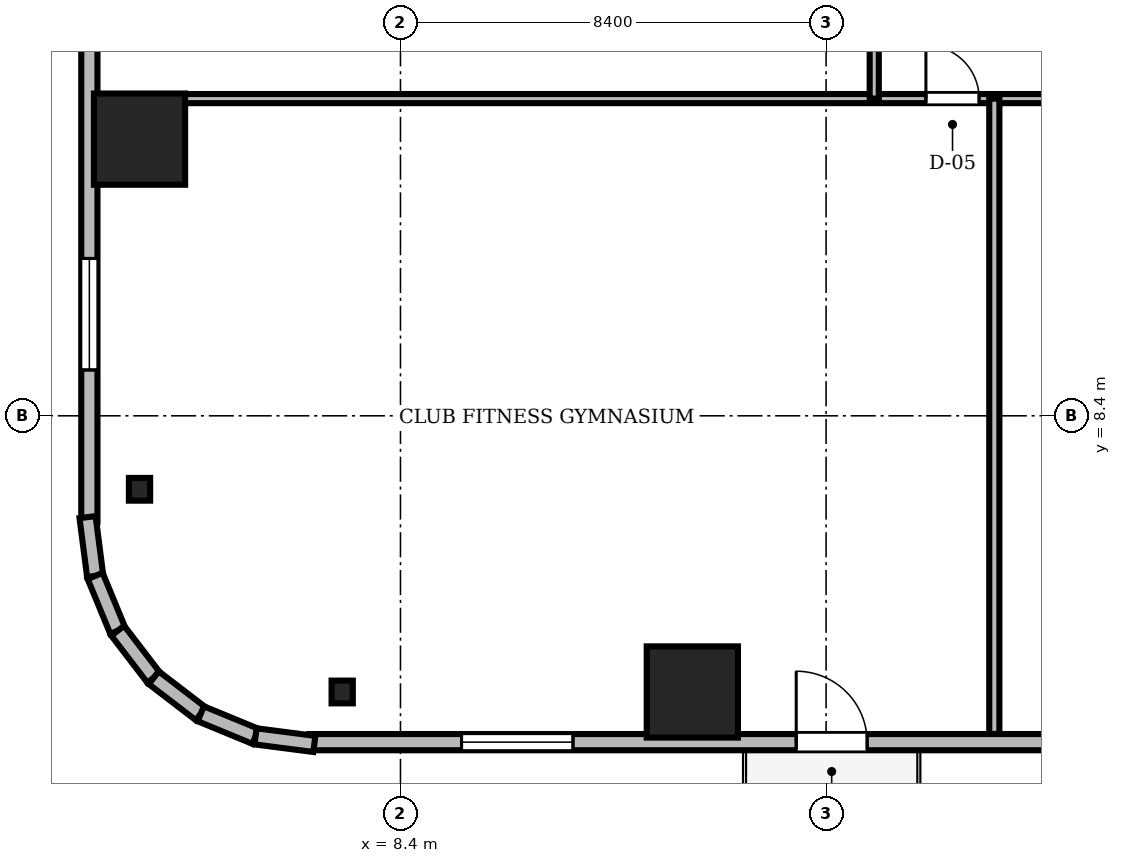
"""IFC4 building model, lengths in metres.
Left out: names, types, materials, properties, quantities, classifications, styles, units other than length and angle.
Written with IfcOpenShell. Run it as: python <this file> out.ifc"""

import sys

from ifc_helpers import new_model, si_unit, direction, frame, frame_2d, origin, origin_2d, place, context, subcontext, project, spatial, rectangle, i_section, extrude, source, transform, mapped, element, fill, save


model = new_model("IFC4")
c1 = context("Model", 3, precision=1e-05, world=origin(), true_north=direction((0.0, 1.0)))
c2 = subcontext(c1, "Body", "Model", "MODEL_VIEW")
j1 = project(units=[si_unit("LENGTHUNIT", "METRE"), si_unit("PLANEANGLEUNIT", "RADIAN")], contexts=[c1])
p1 = place(None, origin())
s1 = spatial("IfcSite", under=j1, at=p1, CompositionType="ELEMENT")
p2 = place(p1, origin())
s2 = spatial("IfcBuilding", under=s1, at=p2, CompositionType="ELEMENT")
p3 = place(p2, frame((0.0, 0.0, 31.25)))
s3 = spatial("IfcBuildingStorey", under=s2, at=p3, CompositionType="ELEMENT", Elevation=31.25)
m1 = source(origin(), c2, "Body", "SweptSolid", [
    extrude(rectangle(XDim=1.8, YDim=1.8, at=origin_2d()), origin(), (0.0, 0.0, 1.0), 3.41),
])
for number, where, z_axis, x_axis in (
    (1, (14.16, 2.95, 0.0), (0.0, 0.0, 1.0), (1.0, 0.0, 0.0)),
    (2, (3.25, 13.86, 0.0), (0.0, 0.0, 1.0), (1.0, 0.0, 0.0)),
):
    element("IfcColumn", number, at=place(p3, frame(where, z_axis=z_axis, x_axis=x_axis)), inside=s3, PredefinedType="COLUMN", context=c2, shape_type="MappedRepresentation", body=[
        mapped(m1, transform((0.0, 0.0, 0.0), scale=1.0)),
    ])
m2 = source(origin(), c2, "Body", "SweptSolid", [
    extrude(i_section(OverallWidth=0.419, OverallDepth=0.449, WebThickness=0.031, FlangeThickness=0.048, FilletRadius=0.015, at=origin_2d()), origin(), (0.0, 0.0, 1.0), 3.41),
])
for number, where, z_axis, x_axis in (
    (3, (7.25, 2.95, 0.0), (0.0, 0.0, 1.0), (1.0, 0.0, 0.0)),
    (4, (3.25, 6.95, 0.0), (0.0, 0.0, 1.0), (1.0, 0.0, 0.0)),
):
    element("IfcColumn", number, at=place(p3, frame(where, z_axis=z_axis, x_axis=x_axis)), inside=s3, PredefinedType="COLUMN", context=c2, shape_type="MappedRepresentation", body=[
        mapped(m2, transform((0.0, 0.0, 0.0), scale=1.0)),
    ])
m3 = source(origin(), c2, "Body", "SweptSolid", [
    extrude(rectangle(XDim=15.6, YDim=0.32, at=frame_2d((7.8, 0.0))), origin(), (0.0, 0.0, 1.0), 3.41),
])
p4 = place(p3, frame((6.6, 1.96, 0.0), z_axis=(0.0, 0.0, 1.0), x_axis=(1.0, 0.0, 0.0)))
e5 = element("IfcWall", 5, at=p4, inside=s3, PredefinedType="SOLIDWALL", context=c2, shape_type="MappedRepresentation", body=[
    mapped(m3, transform((0.0, 0.0, 0.0), scale=1.0)),
])
m4 = source(origin(), c2, "Body", "SweptSolid", [
    extrude(rectangle(XDim=1.4, YDim=2.3, at=frame_2d((0.7, 1.15))), frame((0.0, 0.17, 0.0), z_axis=(0.0, -1.0, 0.0), x_axis=(1.0, 0.0, 0.0)), (0.0, 0.0, 1.0), 0.34),
])
p5 = place(p4, frame((9.61, 0.0, 0.0)))
e6 = element("IfcOpeningElement", 6, at=p5, cuts=e5, PredefinedType="OPENING", context=c2, shape_type="MappedRepresentation", body=[
    mapped(m4, transform((0.0, 0.0, 0.0), scale=1.0)),
])
m5 = source(origin(), c2, "Body", "SweptSolid", [
    extrude(rectangle(XDim=2.2, YDim=2.4, at=frame_2d((1.1, 1.2))), frame((0.0, 0.17, 0.0), z_axis=(0.0, -1.0, 0.0), x_axis=(1.0, 0.0, 0.0)), (0.0, 0.0, 1.0), 0.34),
])
p6 = place(p4, frame((3.005, 0.0, 0.72)))
e7 = element("IfcOpeningElement", 7, at=p6, cuts=e5, PredefinedType="OPENING", context=c2, shape_type="MappedRepresentation", body=[
    mapped(m5, transform((0.0, 0.0, 0.0), scale=1.0)),
])
p7 = place(p3, frame((2.26, 21.9, 0.0), z_axis=(0.0, 0.0, 1.0), x_axis=(0.0, -1.0, 0.0)))
e8 = element("IfcWall", 8, at=p7, inside=s3, PredefinedType="SOLIDWALL", context=c2, shape_type="MappedRepresentation", body=[
    mapped(m3, transform((0.0, 0.0, 0.0), scale=1.0)),
])
p8 = place(p7, frame((10.395, 0.0, 0.72)))
e9 = element("IfcOpeningElement", 9, at=p8, cuts=e8, PredefinedType="OPENING", context=c2, shape_type="MappedRepresentation", body=[
    mapped(m5, transform((0.0, 0.0, 0.0), scale=1.0)),
])
m6 = source(origin(), c2, "Body", "SweptSolid", [
    extrude(rectangle(XDim=1.171, YDim=0.32, at=frame_2d((0.585, 0.0))), origin(), (0.0, 0.0, 1.0), 3.41),
])
p9 = place(p3, frame((2.224, 6.401, 0.0), z_axis=(0.0, 0.0, 1.0), x_axis=(0.128269133229, -0.991739395941, 0.0)))
e10 = element("IfcWall", 10, at=p9, inside=s3, PredefinedType="SOLIDWALL", context=c2, shape_type="MappedRepresentation", body=[
    mapped(m6, transform((0.0, 0.0, 0.0), scale=1.0)),
])
m7 = source(origin(), c2, "Body", "SweptSolid", [
    extrude(rectangle(XDim=1.169, YDim=0.32, at=frame_2d((0.584, 0.0))), origin(), (0.0, 0.0, 1.0), 3.41),
])
for number, where, z_axis, x_axis in (
    (11, (2.375, 5.24, 0.0), (0.0, 0.0, 1.0), (0.381, -0.925, 0.0)),
    (12, (2.82, 4.159, 0.0), (0.0, 0.0, 1.0), (0.608, -0.794, 0.0)),
):
    element("IfcWall", number, at=place(p3, frame(where, z_axis=z_axis, x_axis=x_axis)), inside=s3, PredefinedType="SOLIDWALL", context=c2, shape_type="MappedRepresentation", body=[
        mapped(m7, transform((0.0, 0.0, 0.0), scale=1.0)),
    ])
m8 = source(origin(), c2, "Body", "SweptSolid", [
    extrude(rectangle(XDim=1.169, YDim=0.32, at=frame_2d((0.584, 0.0))), origin(), (0.0, 0.0, 1.0), 3.41),
])
p10 = place(p3, frame((3.531, 3.231, 0.0), z_axis=(0.0, 0.0, 1.0), x_axis=(0.793663520347, -0.608356981114, 0.0)))
e13 = element("IfcWall", 13, at=p10, inside=s3, PredefinedType="SOLIDWALL", context=c2, shape_type="MappedRepresentation", body=[
    mapped(m8, transform((0.0, 0.0, 0.0), scale=1.0)),
])
m9 = source(origin(), c2, "Body", "SweptSolid", [
    extrude(rectangle(XDim=1.169, YDim=0.32, at=frame_2d((0.585, 0.0))), origin(), (0.0, 0.0, 1.0), 3.41),
])
p11 = place(p3, frame((4.459, 2.52, 0.0), z_axis=(0.0, 0.0, 1.0), x_axis=(0.924479075121, -0.381232789334, 0.0)))
e14 = element("IfcWall", 14, at=p11, inside=s3, PredefinedType="SOLIDWALL", context=c2, shape_type="MappedRepresentation", body=[
    mapped(m9, transform((0.0, 0.0, 0.0), scale=1.0)),
])
m10 = source(origin(), c2, "Body", "SweptSolid", [
    extrude(rectangle(XDim=1.17, YDim=0.32, at=frame_2d((0.585, 0.0))), origin(), (0.0, 0.0, 1.0), 3.41),
])
p12 = place(p3, frame((5.54, 2.074, 0.0), z_axis=(0.0, 0.0, 1.0), x_axis=(0.991762485493, -0.128090485085, 0.0)))
e15 = element("IfcWall", 15, at=p12, inside=s3, PredefinedType="SOLIDWALL", context=c2, shape_type="MappedRepresentation", body=[
    mapped(m10, transform((0.0, 0.0, 0.0), scale=1.0)),
])
m11 = source(origin(), c2, "Body", "SweptSolid", [
    extrude(rectangle(XDim=46.156, YDim=0.18, at=frame_2d((23.078, 0.0))), origin(), (0.0, 0.0, 1.0), 2.652),
])
p13 = place(p3, frame((2.422, 14.66, 0.0), z_axis=(0.0, 0.0, 1.0), x_axis=(1.0, 0.0, 0.0)))
e16 = element("IfcWall", 16, at=p13, inside=s3, PredefinedType="PARTITIONING", context=c2, shape_type="MappedRepresentation", body=[
    mapped(m11, transform((0.0, 0.0, 0.0), scale=1.0)),
])
m12 = source(origin(), c2, "Body", "SweptSolid", [
    extrude(rectangle(XDim=1.05, YDim=2.2, at=frame_2d((0.525, 1.1))), frame((0.0, 0.1, 0.0), z_axis=(0.0, -1.0, 0.0), x_axis=(1.0, 0.0, 0.0)), (0.0, 0.0, 1.0), 0.2),
])
p14 = place(p13, frame((16.348, 0.0, 0.0)))
e17 = element("IfcOpeningElement", 17, at=p14, cuts=e16, PredefinedType="OPENING", context=c2, shape_type="MappedRepresentation", body=[
    mapped(m12, transform((0.0, 0.0, 0.0), scale=1.0)),
])
p15 = place(p13, frame((20.38, 0.0, 0.0)))
e18 = element("IfcOpeningElement", 18, at=p15, cuts=e16, PredefinedType="OPENING", context=c2, shape_type="MappedRepresentation", body=[
    mapped(m12, transform((0.0, 0.0, 0.0), scale=1.0)),
])
p16 = place(p13, frame((26.783, 0.0, 0.0)))
e19 = element("IfcOpeningElement", 19, at=p16, cuts=e16, PredefinedType="OPENING", context=c2, shape_type="MappedRepresentation", body=[
    mapped(m12, transform((0.0, 0.0, 0.0), scale=1.0)),
])
p17 = place(p13, frame((33.186, 0.0, 0.0)))
e20 = element("IfcOpeningElement", 20, at=p17, cuts=e16, PredefinedType="OPENING", context=c2, shape_type="MappedRepresentation", body=[
    mapped(m12, transform((0.0, 0.0, 0.0), scale=1.0)),
])
p18 = place(p13, frame((40.998, 0.0, 0.0)))
e21 = element("IfcOpeningElement", 21, at=p18, cuts=e16, PredefinedType="OPENING", context=c2, shape_type="MappedRepresentation", body=[
    mapped(m12, transform((0.0, 0.0, 0.0), scale=1.0)),
])
m13 = source(origin(), c2, "Body", "SweptSolid", [
    extrude(rectangle(XDim=13.89, YDim=0.18, at=frame_2d((6.945, 0.0))), origin(), (0.0, 0.0, 1.0), 2.802),
])
p19 = place(p3, frame((17.75, 14.66, 0.0), z_axis=(0.0, 0.0, 1.0), x_axis=(0.0, 1.0, 0.0)))
e22 = element("IfcWall", 22, at=p19, inside=s3, PredefinedType="PARTITIONING", context=c2, shape_type="MappedRepresentation", body=[
    mapped(m13, transform((0.0, 0.0, 0.0), scale=1.0)),
])
p20 = place(p19, frame((1.77, 0.0, 0.0)))
e23 = element("IfcOpeningElement", 23, at=p20, cuts=e22, PredefinedType="OPENING", context=c2, shape_type="MappedRepresentation", body=[
    mapped(m12, transform((0.0, 0.0, 0.0), scale=1.0)),
])
m14 = source(origin(), c2, "Body", "SweptSolid", [
    extrude(rectangle(XDim=0.95, YDim=2.15, at=frame_2d((0.475, 1.075))), frame((0.0, 0.1, 0.0), z_axis=(0.0, -1.0, 0.0), x_axis=(1.0, 0.0, 0.0)), (0.0, 0.0, 1.0), 0.2),
])
p21 = place(p19, frame((7.575, 0.0, 0.0)))
e24 = element("IfcOpeningElement", 24, at=p21, cuts=e22, PredefinedType="OPENING", context=c2, shape_type="MappedRepresentation", body=[
    mapped(m14, transform((0.0, 0.0, 0.0), scale=1.0)),
])
p22 = place(p19, frame((10.93, 0.0, 0.0)))
e25 = element("IfcOpeningElement", 25, at=p22, cuts=e22, PredefinedType="OPENING", context=c2, shape_type="MappedRepresentation", body=[
    mapped(m12, transform((0.0, 0.0, 0.0), scale=1.0)),
])
m15 = source(origin(), c2, "Body", "SweptSolid", [
    extrude(rectangle(XDim=12.538, YDim=0.2, at=frame_2d((6.269, 0.0))), origin(), (0.0, 0.0, 1.0), 2.652),
])
p23 = place(p3, frame((20.12, 2.122, 0.0), z_axis=(0.0, 0.0, 1.0), x_axis=(0.0, 1.0, 0.0)))
e26 = element("IfcWall", 26, at=p23, inside=s3, PredefinedType="PARTITIONING", context=c2, shape_type="MappedRepresentation", body=[
    mapped(m15, transform((0.0, 0.0, 0.0), scale=1.0)),
])
m16 = source(origin(), c2, "Body", "SweptSolid", [
    extrude(rectangle(XDim=1.4, YDim=2.3, at=frame_2d((0.7, 1.15))), frame((0.0, 0.025, 0.0), z_axis=(0.0, -1.0, 0.0), x_axis=(1.0, 0.0, 0.0)), (0.0, 0.0, 1.0), 0.05),
])
p24 = place(p5, frame((1.4, 0.0, 0.0), z_axis=(0.0, 0.0, 1.0), x_axis=(-1.0, 0.0, 0.0)))
e27 = element("IfcDoor", 27, at=p24, inside=s3, OperationType="DOUBLE_DOOR_SLIDING", PredefinedType="DOOR", context=c2, shape_type="MappedRepresentation", body=[
    mapped(m16, transform((0.0, 0.0, 0.0), scale=1.0)),
])
fill(e6, e27)
m17 = source(origin(), c2, "Body", "SweptSolid", [
    extrude(rectangle(XDim=2.2, YDim=2.4, at=frame_2d((1.1, 1.2))), frame((0.0, 0.03, 0.0), z_axis=(0.0, -1.0, 0.0), x_axis=(1.0, 0.0, 0.0)), (0.0, 0.0, 1.0), 0.06),
])
p25 = place(p6, origin())
e28 = element("IfcWindow", 28, at=p25, inside=s3, PartitioningType="SINGLE_PANEL", PredefinedType="WINDOW", context=c2, shape_type="MappedRepresentation", body=[
    mapped(m17, transform((0.0, 0.0, 0.0), scale=1.0)),
])
fill(e7, e28)
p26 = place(p8, origin())
e29 = element("IfcWindow", 29, at=p26, inside=s3, PartitioningType="SINGLE_PANEL", PredefinedType="WINDOW", context=c2, shape_type="MappedRepresentation", body=[
    mapped(m17, transform((0.0, 0.0, 0.0), scale=1.0)),
])
fill(e9, e29)
m18 = source(origin(), c2, "Body", "SweptSolid", [
    extrude(rectangle(XDim=1.05, YDim=2.2, at=frame_2d((0.525, 1.1))), frame((0.0, 0.025, 0.0), z_axis=(0.0, -1.0, 0.0), x_axis=(1.0, 0.0, 0.0)), (0.0, 0.0, 1.0), 0.05),
])
p27 = place(p14, origin())
e30 = element("IfcDoor", 30, at=p27, inside=s3, OperationType="SINGLE_SWING_LEFT", PredefinedType="DOOR", context=c2, shape_type="MappedRepresentation", body=[
    mapped(m18, transform((0.0, 0.0, 0.0), scale=1.0)),
])
fill(e17, e30)
save(model, sys.argv[1])
